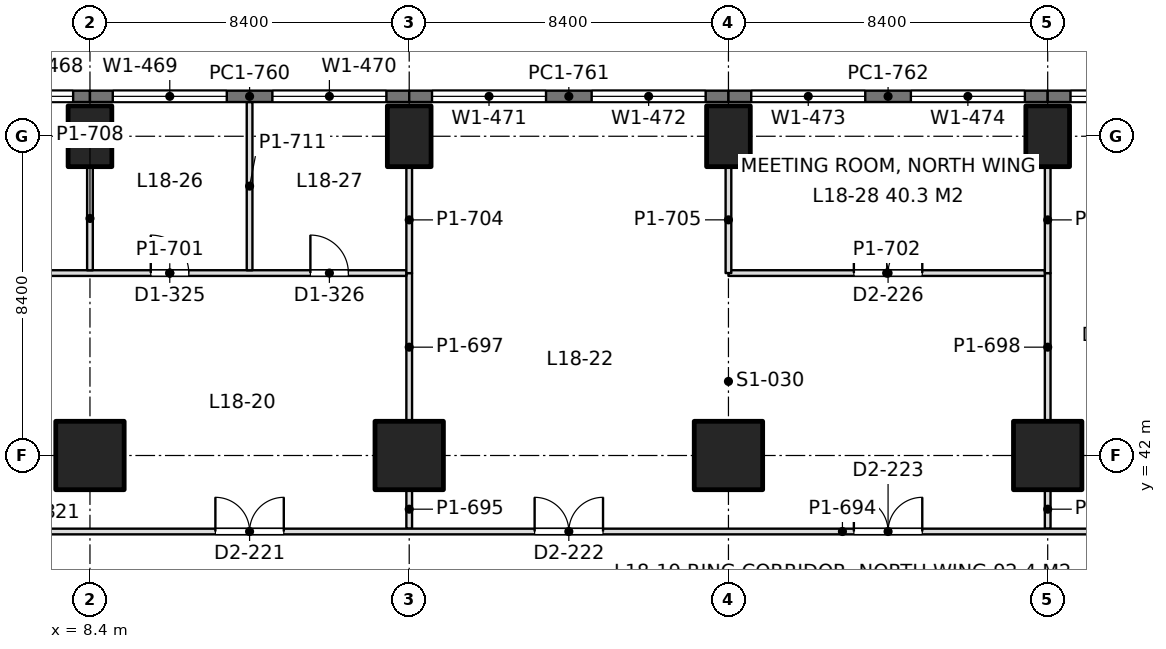
"""IFC4 building model, lengths in metres.
Left out: names, types, materials, properties, quantities, classifications, styles, units other than length and angle.
Written with IfcOpenShell. Run it as: python <this file> out.ifc"""

import sys

from ifc_helpers import new_model, si_unit, direction, frame, frame_2d, origin, origin_2d, place, context, subcontext, project, spatial, rectangle, extrude, element, fill, save


model = new_model("IFC4")
c1 = context("Model", 3, precision=1e-05, world=origin(), true_north=direction((0.0, 1.0)))
c2 = subcontext(c1, "Body", "Model", "MODEL_VIEW")
j1 = project(units=[si_unit("LENGTHUNIT", "METRE"), si_unit("PLANEANGLEUNIT", "RADIAN")], contexts=[c1])
p1 = place(None, origin())
s1 = spatial("IfcSite", under=j1, at=p1, CompositionType="ELEMENT")
p2 = place(p1, origin())
s2 = spatial("IfcBuilding", under=s1, at=p2, CompositionType="ELEMENT")
p3 = place(p2, frame((0.0, 0.0, 81.9)))
s3 = spatial("IfcBuildingStorey", under=s2, at=p3, CompositionType="ELEMENT", Elevation=81.9)
p4 = place(p3, frame((8.4, 42.0, 0.0), z_axis=(0.0, 0.0, 1.0), x_axis=(1.0, 0.0, 0.0)))
e1 = element("IfcColumn", 1, at=p4, inside=s3, PredefinedType="COLUMN", context=c2, shape_type="SweptSolid", body=[
    extrude(rectangle(XDim=1.8, YDim=1.8, at=origin_2d()), origin(), (0.0, 0.0, 1.0), 4.5),
])
p5 = place(p3, frame((8.4, 50.4, 0.0), z_axis=(0.0, 0.0, 1.0), x_axis=(1.0, 0.0, 0.0)))
e2 = element("IfcColumn", 2, at=p5, inside=s3, PredefinedType="COLUMN", context=c2, shape_type="SweptSolid", body=[
    extrude(rectangle(XDim=1.15, YDim=1.6, at=origin_2d()), origin(), (0.0, 0.0, 1.0), 4.5),
])
p6 = place(p3, frame((16.8, 42.0, 0.0), z_axis=(0.0, 0.0, 1.0), x_axis=(1.0, 0.0, 0.0)))
e3 = element("IfcColumn", 3, at=p6, inside=s3, PredefinedType="COLUMN", context=c2, shape_type="SweptSolid", body=[
    extrude(rectangle(XDim=1.8, YDim=1.8, at=origin_2d()), origin(), (0.0, 0.0, 1.0), 4.5),
])
p7 = place(p3, frame((16.8, 50.4, 0.0), z_axis=(0.0, 0.0, 1.0), x_axis=(1.0, 0.0, 0.0)))
e4 = element("IfcColumn", 4, at=p7, inside=s3, PredefinedType="COLUMN", context=c2, shape_type="SweptSolid", body=[
    extrude(rectangle(XDim=1.15, YDim=1.6, at=origin_2d()), origin(), (0.0, 0.0, 1.0), 4.5),
])
p8 = place(p3, frame((25.2, 42.0, 0.0), z_axis=(0.0, 0.0, 1.0), x_axis=(1.0, 0.0, 0.0)))
e5 = element("IfcColumn", 5, at=p8, inside=s3, PredefinedType="COLUMN", context=c2, shape_type="SweptSolid", body=[
    extrude(rectangle(XDim=1.8, YDim=1.8, at=origin_2d()), origin(), (0.0, 0.0, 1.0), 4.5),
])
p9 = place(p3, frame((25.2, 50.4, 0.0), z_axis=(0.0, 0.0, 1.0), x_axis=(1.0, 0.0, 0.0)))
e6 = element("IfcColumn", 6, at=p9, inside=s3, PredefinedType="COLUMN", context=c2, shape_type="SweptSolid", body=[
    extrude(rectangle(XDim=1.15, YDim=1.6, at=origin_2d()), origin(), (0.0, 0.0, 1.0), 4.5),
])
p10 = place(p3, frame((33.6, 42.0, 0.0), z_axis=(0.0, 0.0, 1.0), x_axis=(1.0, 0.0, 0.0)))
e7 = element("IfcColumn", 7, at=p10, inside=s3, PredefinedType="COLUMN", context=c2, shape_type="SweptSolid", body=[
    extrude(rectangle(XDim=1.8, YDim=1.8, at=origin_2d()), origin(), (0.0, 0.0, 1.0), 4.5),
])
p11 = place(p3, frame((33.6, 50.4, 0.0), z_axis=(0.0, 0.0, 1.0), x_axis=(1.0, 0.0, 0.0)))
e8 = element("IfcColumn", 8, at=p11, inside=s3, PredefinedType="COLUMN", context=c2, shape_type="SweptSolid", body=[
    extrude(rectangle(XDim=1.15, YDim=1.6, at=origin_2d()), origin(), (0.0, 0.0, 1.0), 4.5),
])
p12 = place(p3, frame((0.315, 51.45, 0.0), z_axis=(0.0, 0.0, 1.0), x_axis=(1.0, 0.0, 0.0)))
e9 = element("IfcWall", 9, at=p12, inside=s3, PredefinedType="SOLIDWALL", context=c2, shape_type="SweptSolid", body=[
    extrude(rectangle(XDim=8.085, YDim=0.3, at=frame_2d((4.042, 0.0))), origin(), (0.0, 0.0, 1.0), 4.34),
])
p13 = place(p12, frame((0.443, 0.0, 0.9)))
e10 = element("IfcOpeningElement", 10, at=p13, cuts=e9, PredefinedType="OPENING", context=c2, shape_type="SweptSolid", body=[
    extrude(rectangle(XDim=3.0, YDim=1.9, at=frame_2d((1.5, 0.95))), frame((0.0, 0.16, 0.0), z_axis=(0.0, -1.0, 0.0), x_axis=(1.0, 0.0, 0.0)), (0.0, 0.0, 1.0), 0.32),
])
p14 = place(p12, frame((4.643, 0.0, 0.9)))
e11 = element("IfcOpeningElement", 11, at=p14, cuts=e9, PredefinedType="OPENING", context=c2, shape_type="SweptSolid", body=[
    extrude(rectangle(XDim=3.0, YDim=1.9, at=frame_2d((1.5, 0.95))), frame((0.0, 0.16, 0.0), z_axis=(0.0, -1.0, 0.0), x_axis=(1.0, 0.0, 0.0)), (0.0, 0.0, 1.0), 0.32),
])
p15 = place(p3, frame((8.4, 51.45, 0.0), z_axis=(0.0, 0.0, 1.0), x_axis=(1.0, 0.0, 0.0)))
e12 = element("IfcWall", 12, at=p15, inside=s3, PredefinedType="SOLIDWALL", context=c2, shape_type="SweptSolid", body=[
    extrude(rectangle(XDim=8.4, YDim=0.3, at=frame_2d((4.2, 0.0))), origin(), (0.0, 0.0, 1.0), 4.34),
])
p16 = place(p15, frame((0.6, 0.0, 0.9)))
e13 = element("IfcOpeningElement", 13, at=p16, cuts=e12, PredefinedType="OPENING", context=c2, shape_type="SweptSolid", body=[
    extrude(rectangle(XDim=3.0, YDim=1.9, at=frame_2d((1.5, 0.95))), frame((0.0, 0.16, 0.0), z_axis=(0.0, -1.0, 0.0), x_axis=(1.0, 0.0, 0.0)), (0.0, 0.0, 1.0), 0.32),
])
p17 = place(p15, frame((4.8, 0.0, 0.9)))
e14 = element("IfcOpeningElement", 14, at=p17, cuts=e12, PredefinedType="OPENING", context=c2, shape_type="SweptSolid", body=[
    extrude(rectangle(XDim=3.0, YDim=1.9, at=frame_2d((1.5, 0.95))), frame((0.0, 0.16, 0.0), z_axis=(0.0, -1.0, 0.0), x_axis=(1.0, 0.0, 0.0)), (0.0, 0.0, 1.0), 0.32),
])
p18 = place(p3, frame((16.8, 51.45, 0.0), z_axis=(0.0, 0.0, 1.0), x_axis=(1.0, 0.0, 0.0)))
e15 = element("IfcWall", 15, at=p18, inside=s3, PredefinedType="SOLIDWALL", context=c2, shape_type="SweptSolid", body=[
    extrude(rectangle(XDim=8.4, YDim=0.3, at=frame_2d((4.2, 0.0))), origin(), (0.0, 0.0, 1.0), 4.34),
])
p19 = place(p18, frame((0.6, 0.0, 0.9)))
e16 = element("IfcOpeningElement", 16, at=p19, cuts=e15, PredefinedType="OPENING", context=c2, shape_type="SweptSolid", body=[
    extrude(rectangle(XDim=3.0, YDim=1.9, at=frame_2d((1.5, 0.95))), frame((0.0, 0.16, 0.0), z_axis=(0.0, -1.0, 0.0), x_axis=(1.0, 0.0, 0.0)), (0.0, 0.0, 1.0), 0.32),
])
p20 = place(p18, frame((4.8, 0.0, 0.9)))
e17 = element("IfcOpeningElement", 17, at=p20, cuts=e15, PredefinedType="OPENING", context=c2, shape_type="SweptSolid", body=[
    extrude(rectangle(XDim=3.0, YDim=1.9, at=frame_2d((1.5, 0.95))), frame((0.0, 0.16, 0.0), z_axis=(0.0, -1.0, 0.0), x_axis=(1.0, 0.0, 0.0)), (0.0, 0.0, 1.0), 0.32),
])
p21 = place(p3, frame((25.2, 51.45, 0.0), z_axis=(0.0, 0.0, 1.0), x_axis=(1.0, 0.0, 0.0)))
e18 = element("IfcWall", 18, at=p21, inside=s3, PredefinedType="SOLIDWALL", context=c2, shape_type="SweptSolid", body=[
    extrude(rectangle(XDim=8.4, YDim=0.3, at=frame_2d((4.2, 0.0))), origin(), (0.0, 0.0, 1.0), 4.34),
])
p22 = place(p21, frame((0.6, 0.0, 0.9)))
e19 = element("IfcOpeningElement", 19, at=p22, cuts=e18, PredefinedType="OPENING", context=c2, shape_type="SweptSolid", body=[
    extrude(rectangle(XDim=3.0, YDim=1.9, at=frame_2d((1.5, 0.95))), frame((0.0, 0.16, 0.0), z_axis=(0.0, -1.0, 0.0), x_axis=(1.0, 0.0, 0.0)), (0.0, 0.0, 1.0), 0.32),
])
p23 = place(p21, frame((4.8, 0.0, 0.9)))
e20 = element("IfcOpeningElement", 20, at=p23, cuts=e18, PredefinedType="OPENING", context=c2, shape_type="SweptSolid", body=[
    extrude(rectangle(XDim=3.0, YDim=1.9, at=frame_2d((1.5, 0.95))), frame((0.0, 0.16, 0.0), z_axis=(0.0, -1.0, 0.0), x_axis=(1.0, 0.0, 0.0)), (0.0, 0.0, 1.0), 0.32),
])
p24 = place(p3, frame((33.6, 51.45, 0.0), z_axis=(0.0, 0.0, 1.0), x_axis=(1.0, 0.0, 0.0)))
e21 = element("IfcWall", 21, at=p24, inside=s3, PredefinedType="SOLIDWALL", context=c2, shape_type="SweptSolid", body=[
    extrude(rectangle(XDim=8.4, YDim=0.3, at=frame_2d((4.2, 0.0))), origin(), (0.0, 0.0, 1.0), 4.34),
])
p25 = place(p24, frame((0.6, 0.0, 0.9)))
e22 = element("IfcOpeningElement", 22, at=p25, cuts=e21, PredefinedType="OPENING", context=c2, shape_type="SweptSolid", body=[
    extrude(rectangle(XDim=3.0, YDim=1.9, at=frame_2d((1.5, 0.95))), frame((0.0, 0.16, 0.0), z_axis=(0.0, -1.0, 0.0), x_axis=(1.0, 0.0, 0.0)), (0.0, 0.0, 1.0), 0.32),
])
p26 = place(p24, frame((4.8, 0.0, 0.9)))
e23 = element("IfcOpeningElement", 23, at=p26, cuts=e21, PredefinedType="OPENING", context=c2, shape_type="SweptSolid", body=[
    extrude(rectangle(XDim=3.0, YDim=1.9, at=frame_2d((1.5, 0.95))), frame((0.0, 0.16, 0.0), z_axis=(0.0, -1.0, 0.0), x_axis=(1.0, 0.0, 0.0)), (0.0, 0.0, 1.0), 0.32),
])
p27 = place(p3, frame((4.274, 46.8, 0.0), z_axis=(0.0, 0.0, 1.0), x_axis=(1.0, 0.0, 0.0)))
e24 = element("IfcWall", 24, at=p27, inside=s3, PredefinedType="PARTITIONING", context=c2, shape_type="SweptSolid", body=[
    extrude(rectangle(XDim=12.452, YDim=0.15, at=frame_2d((6.226, 0.0))), origin(), (0.0, 0.0, 1.0), 3.74),
])
p28 = place(p27, frame((1.526, 0.0, 0.0)))
e25 = element("IfcOpeningElement", 25, at=p28, cuts=e24, PredefinedType="OPENING", context=c2, shape_type="SweptSolid", body=[
    extrude(rectangle(XDim=1.0, YDim=2.2, at=frame_2d((0.5, 1.1))), frame((0.0, 0.085, 0.0), z_axis=(0.0, -1.0, 0.0), x_axis=(1.0, 0.0, 0.0)), (0.0, 0.0, 1.0), 0.17),
])
p29 = place(p27, frame((5.726, 0.0, 0.0)))
e26 = element("IfcOpeningElement", 26, at=p29, cuts=e24, PredefinedType="OPENING", context=c2, shape_type="SweptSolid", body=[
    extrude(rectangle(XDim=1.0, YDim=2.2, at=frame_2d((0.5, 1.1))), frame((0.0, 0.085, 0.0), z_axis=(0.0, -1.0, 0.0), x_axis=(1.0, 0.0, 0.0)), (0.0, 0.0, 1.0), 0.17),
])
p30 = place(p27, frame((9.926, 0.0, 0.0)))
e27 = element("IfcOpeningElement", 27, at=p30, cuts=e24, PredefinedType="OPENING", context=c2, shape_type="SweptSolid", body=[
    extrude(rectangle(XDim=1.0, YDim=2.2, at=frame_2d((0.5, 1.1))), frame((0.0, 0.085, 0.0), z_axis=(0.0, -1.0, 0.0), x_axis=(1.0, 0.0, 0.0)), (0.0, 0.0, 1.0), 0.17),
])
p31 = place(p3, frame((8.4, 46.874, 0.0), z_axis=(0.0, 0.0, 1.0), x_axis=(0.0, 1.0, 0.0)))
e28 = element("IfcWall", 28, at=p31, inside=s3, PredefinedType="PARTITIONING", context=c2, shape_type="SweptSolid", body=[
    extrude(rectangle(XDim=2.727, YDim=0.15, at=frame_2d((1.364, 0.0))), origin(), (0.0, 0.0, 1.0), 3.74),
])
p32 = place(p3, frame((12.6, 46.874, 0.0), z_axis=(0.0, 0.0, 1.0), x_axis=(0.0, 1.0, 0.0)))
e29 = element("IfcWall", 29, at=p32, inside=s3, PredefinedType="PARTITIONING", context=c2, shape_type="SweptSolid", body=[
    extrude(rectangle(XDim=4.428, YDim=0.15, at=frame_2d((2.214, 0.0))), origin(), (0.0, 0.0, 1.0), 3.84),
])
p33 = place(p3, frame((16.8, 46.798, 0.0), z_axis=(0.0, 0.0, 1.0), x_axis=(0.0, 1.0, 0.0)))
e30 = element("IfcWall", 30, at=p33, inside=s3, PredefinedType="PARTITIONING", context=c2, shape_type="SweptSolid", body=[
    extrude(rectangle(XDim=2.803, YDim=0.15, at=frame_2d((1.401, 0.0))), origin(), (0.0, 0.0, 1.0), 3.74),
])
p34 = place(p3, frame((25.2, 46.8, 0.0), z_axis=(0.0, 0.0, 1.0), x_axis=(1.0, 0.0, 0.0)))
e31 = element("IfcWall", 31, at=p34, inside=s3, PredefinedType="PARTITIONING", context=c2, shape_type="SweptSolid", body=[
    extrude(rectangle(XDim=8.326, YDim=0.15, at=frame_2d((4.163, 0.0))), origin(), (0.0, 0.0, 1.0), 3.74),
])
p35 = place(p34, frame((3.3, 0.0, 0.0)))
e32 = element("IfcOpeningElement", 32, at=p35, cuts=e31, PredefinedType="OPENING", context=c2, shape_type="SweptSolid", body=[
    extrude(rectangle(XDim=1.8, YDim=2.2, at=frame_2d((0.9, 1.1))), frame((0.0, 0.085, 0.0), z_axis=(0.0, -1.0, 0.0), x_axis=(1.0, 0.0, 0.0)), (0.0, 0.0, 1.0), 0.17),
])
p36 = place(p3, frame((25.2, 46.8, 0.0), z_axis=(0.0, 0.0, 1.0), x_axis=(0.0, 1.0, 0.0)))
e33 = element("IfcWall", 33, at=p36, inside=s3, PredefinedType="PARTITIONING", context=c2, shape_type="SweptSolid", body=[
    extrude(rectangle(XDim=2.801, YDim=0.15, at=frame_2d((1.4, 0.0))), origin(), (0.0, 0.0, 1.0), 3.74),
])
p37 = place(p3, frame((33.6, 46.798, 0.0), z_axis=(0.0, 0.0, 1.0), x_axis=(0.0, 1.0, 0.0)))
e34 = element("IfcWall", 34, at=p37, inside=s3, PredefinedType="PARTITIONING", context=c2, shape_type="SweptSolid", body=[
    extrude(rectangle(XDim=2.803, YDim=0.15, at=frame_2d((1.401, 0.0))), origin(), (0.0, 0.0, 1.0), 3.74),
])
p38 = place(p3, frame((16.8, 40.074, 0.0), z_axis=(0.0, 0.0, 1.0), x_axis=(0.0, 1.0, 0.0)))
e35 = element("IfcWall", 35, at=p38, inside=s3, PredefinedType="PARTITIONING", context=c2, shape_type="SweptSolid", body=[
    extrude(rectangle(XDim=1.027, YDim=0.15, at=frame_2d((0.514, 0.0))), origin(), (0.0, 0.0, 1.0), 3.98),
])
p39 = place(p3, frame((16.8, 42.899, 0.0), z_axis=(0.0, 0.0, 1.0), x_axis=(0.0, 1.0, 0.0)))
e36 = element("IfcWall", 36, at=p39, inside=s3, PredefinedType="PARTITIONING", context=c2, shape_type="SweptSolid", body=[
    extrude(rectangle(XDim=3.903, YDim=0.15, at=frame_2d((1.952, 0.0))), origin(), (0.0, 0.0, 1.0), 3.74),
])
p40 = place(p3, frame((33.6, 40.074, 0.0), z_axis=(0.0, 0.0, 1.0), x_axis=(0.0, 1.0, 0.0)))
e37 = element("IfcWall", 37, at=p40, inside=s3, PredefinedType="PARTITIONING", context=c2, shape_type="SweptSolid", body=[
    extrude(rectangle(XDim=1.027, YDim=0.15, at=frame_2d((0.514, 0.0))), origin(), (0.0, 0.0, 1.0), 3.98),
])
p41 = place(p3, frame((33.6, 42.899, 0.0), z_axis=(0.0, 0.0, 1.0), x_axis=(0.0, 1.0, 0.0)))
e38 = element("IfcWall", 38, at=p41, inside=s3, PredefinedType="PARTITIONING", context=c2, shape_type="SweptSolid", body=[
    extrude(rectangle(XDim=3.903, YDim=0.15, at=frame_2d((1.952, 0.0))), origin(), (0.0, 0.0, 1.0), 3.74),
])
p42 = place(p3, frame((7.198, 40.0, 0.0), z_axis=(0.0, 0.0, 1.0), x_axis=(1.0, 0.0, 0.0)))
e39 = element("IfcWall", 39, at=p42, inside=s3, PredefinedType="PARTITIONING", context=c2, shape_type="SweptSolid", body=[
    extrude(rectangle(XDim=42.002, YDim=0.15, at=frame_2d((21.001, 0.0))), origin(), (0.0, 0.0, 1.0), 3.74),
])
p43 = place(p42, frame((4.502, 0.0, 0.0)))
e40 = element("IfcOpeningElement", 40, at=p43, cuts=e39, PredefinedType="OPENING", context=c2, shape_type="SweptSolid", body=[
    extrude(rectangle(XDim=1.8, YDim=2.2, at=frame_2d((0.9, 1.1))), frame((0.0, 0.085, 0.0), z_axis=(0.0, -1.0, 0.0), x_axis=(1.0, 0.0, 0.0)), (0.0, 0.0, 1.0), 0.17),
])
p44 = place(p42, frame((12.902, 0.0, 0.0)))
e41 = element("IfcOpeningElement", 41, at=p44, cuts=e39, PredefinedType="OPENING", context=c2, shape_type="SweptSolid", body=[
    extrude(rectangle(XDim=1.8, YDim=2.2, at=frame_2d((0.9, 1.1))), frame((0.0, 0.085, 0.0), z_axis=(0.0, -1.0, 0.0), x_axis=(1.0, 0.0, 0.0)), (0.0, 0.0, 1.0), 0.17),
])
p45 = place(p42, frame((21.302, 0.0, 0.0)))
e42 = element("IfcOpeningElement", 42, at=p45, cuts=e39, PredefinedType="OPENING", context=c2, shape_type="SweptSolid", body=[
    extrude(rectangle(XDim=1.8, YDim=2.2, at=frame_2d((0.9, 1.1))), frame((0.0, 0.085, 0.0), z_axis=(0.0, -1.0, 0.0), x_axis=(1.0, 0.0, 0.0)), (0.0, 0.0, 1.0), 0.17),
])
p46 = place(p42, frame((29.702, 0.0, 0.0)))
e43 = element("IfcOpeningElement", 43, at=p46, cuts=e39, PredefinedType="OPENING", context=c2, shape_type="SweptSolid", body=[
    extrude(rectangle(XDim=1.8, YDim=2.2, at=frame_2d((0.9, 1.1))), frame((0.0, 0.085, 0.0), z_axis=(0.0, -1.0, 0.0), x_axis=(1.0, 0.0, 0.0)), (0.0, 0.0, 1.0), 0.17),
])
p47 = place(p42, frame((38.102, 0.0, 0.0)))
e44 = element("IfcOpeningElement", 44, at=p47, cuts=e39, PredefinedType="OPENING", context=c2, shape_type="SweptSolid", body=[
    extrude(rectangle(XDim=1.8, YDim=2.2, at=frame_2d((0.9, 1.1))), frame((0.0, 0.085, 0.0), z_axis=(0.0, -1.0, 0.0), x_axis=(1.0, 0.0, 0.0)), (0.0, 0.0, 1.0), 0.17),
])
p48 = place(p14, origin())
e45 = element("IfcWindow", 45, at=p48, inside=s3, PartitioningType="SINGLE_PANEL", PredefinedType="WINDOW", context=c2, shape_type="SweptSolid", body=[
    extrude(rectangle(XDim=3.0, YDim=1.9, at=frame_2d((1.5, 0.95))), frame((0.0, 0.03, 0.0), z_axis=(0.0, -1.0, 0.0), x_axis=(1.0, 0.0, 0.0)), (0.0, 0.0, 1.0), 0.06),
])
fill(e11, e45)
p49 = place(p16, origin())
e46 = element("IfcWindow", 46, at=p49, inside=s3, PartitioningType="SINGLE_PANEL", PredefinedType="WINDOW", context=c2, shape_type="SweptSolid", body=[
    extrude(rectangle(XDim=3.0, YDim=1.9, at=frame_2d((1.5, 0.95))), frame((0.0, 0.03, 0.0), z_axis=(0.0, -1.0, 0.0), x_axis=(1.0, 0.0, 0.0)), (0.0, 0.0, 1.0), 0.06),
])
fill(e13, e46)
p50 = place(p17, origin())
e47 = element("IfcWindow", 47, at=p50, inside=s3, PartitioningType="SINGLE_PANEL", PredefinedType="WINDOW", context=c2, shape_type="SweptSolid", body=[
    extrude(rectangle(XDim=3.0, YDim=1.9, at=frame_2d((1.5, 0.95))), frame((0.0, 0.03, 0.0), z_axis=(0.0, -1.0, 0.0), x_axis=(1.0, 0.0, 0.0)), (0.0, 0.0, 1.0), 0.06),
])
fill(e14, e47)
p51 = place(p19, origin())
e48 = element("IfcWindow", 48, at=p51, inside=s3, PartitioningType="SINGLE_PANEL", PredefinedType="WINDOW", context=c2, shape_type="SweptSolid", body=[
    extrude(rectangle(XDim=3.0, YDim=1.9, at=frame_2d((1.5, 0.95))), frame((0.0, 0.03, 0.0), z_axis=(0.0, -1.0, 0.0), x_axis=(1.0, 0.0, 0.0)), (0.0, 0.0, 1.0), 0.06),
])
fill(e16, e48)
p52 = place(p20, origin())
e49 = element("IfcWindow", 49, at=p52, inside=s3, PartitioningType="SINGLE_PANEL", PredefinedType="WINDOW", context=c2, shape_type="SweptSolid", body=[
    extrude(rectangle(XDim=3.0, YDim=1.9, at=frame_2d((1.5, 0.95))), frame((0.0, 0.03, 0.0), z_axis=(0.0, -1.0, 0.0), x_axis=(1.0, 0.0, 0.0)), (0.0, 0.0, 1.0), 0.06),
])
fill(e17, e49)
p53 = place(p22, origin())
e50 = element("IfcWindow", 50, at=p53, inside=s3, PartitioningType="SINGLE_PANEL", PredefinedType="WINDOW", context=c2, shape_type="SweptSolid", body=[
    extrude(rectangle(XDim=3.0, YDim=1.9, at=frame_2d((1.5, 0.95))), frame((0.0, 0.03, 0.0), z_axis=(0.0, -1.0, 0.0), x_axis=(1.0, 0.0, 0.0)), (0.0, 0.0, 1.0), 0.06),
])
fill(e19, e50)
p54 = place(p23, origin())
e51 = element("IfcWindow", 51, at=p54, inside=s3, PartitioningType="SINGLE_PANEL", PredefinedType="WINDOW", context=c2, shape_type="SweptSolid", body=[
    extrude(rectangle(XDim=3.0, YDim=1.9, at=frame_2d((1.5, 0.95))), frame((0.0, 0.03, 0.0), z_axis=(0.0, -1.0, 0.0), x_axis=(1.0, 0.0, 0.0)), (0.0, 0.0, 1.0), 0.06),
])
fill(e20, e51)
p55 = place(p25, origin())
e52 = element("IfcWindow", 52, at=p55, inside=s3, PartitioningType="SINGLE_PANEL", PredefinedType="WINDOW", context=c2, shape_type="SweptSolid", body=[
    extrude(rectangle(XDim=3.0, YDim=1.9, at=frame_2d((1.5, 0.95))), frame((0.0, 0.03, 0.0), z_axis=(0.0, -1.0, 0.0), x_axis=(1.0, 0.0, 0.0)), (0.0, 0.0, 1.0), 0.06),
])
fill(e22, e52)
p56 = place(p29, origin())
e53 = element("IfcDoor", 53, at=p56, inside=s3, OperationType="SINGLE_SWING_LEFT", PredefinedType="DOOR", context=c2, shape_type="SweptSolid", body=[
    extrude(rectangle(XDim=1.0, YDim=2.2, at=frame_2d((0.5, 1.1))), frame((0.0, 0.025, 0.0), z_axis=(0.0, -1.0, 0.0), x_axis=(1.0, 0.0, 0.0)), (0.0, 0.0, 1.0), 0.05),
])
fill(e26, e53)
p57 = place(p30, origin())
e54 = element("IfcDoor", 54, at=p57, inside=s3, OperationType="SINGLE_SWING_LEFT", PredefinedType="DOOR", context=c2, shape_type="SweptSolid", body=[
    extrude(rectangle(XDim=1.0, YDim=2.2, at=frame_2d((0.5, 1.1))), frame((0.0, 0.025, 0.0), z_axis=(0.0, -1.0, 0.0), x_axis=(1.0, 0.0, 0.0)), (0.0, 0.0, 1.0), 0.05),
])
fill(e27, e54)
p58 = place(p35, origin())
e55 = element("IfcDoor", 55, at=p58, inside=s3, OperationType="DOUBLE_DOOR_SINGLE_SWING", PredefinedType="DOOR", context=c2, shape_type="SweptSolid", body=[
    extrude(rectangle(XDim=1.8, YDim=2.2, at=frame_2d((0.9, 1.1))), frame((0.0, 0.025, 0.0), z_axis=(0.0, -1.0, 0.0), x_axis=(1.0, 0.0, 0.0)), (0.0, 0.0, 1.0), 0.05),
])
fill(e32, e55)
p59 = place(p43, origin())
e56 = element("IfcDoor", 56, at=p59, inside=s3, OperationType="DOUBLE_DOOR_SINGLE_SWING", PredefinedType="DOOR", context=c2, shape_type="SweptSolid", body=[
    extrude(rectangle(XDim=1.8, YDim=2.2, at=frame_2d((0.9, 1.1))), frame((0.0, 0.025, 0.0), z_axis=(0.0, -1.0, 0.0), x_axis=(1.0, 0.0, 0.0)), (0.0, 0.0, 1.0), 0.05),
])
fill(e40, e56)
p60 = place(p44, origin())
e57 = element("IfcDoor", 57, at=p60, inside=s3, OperationType="DOUBLE_DOOR_SINGLE_SWING", PredefinedType="DOOR", context=c2, shape_type="SweptSolid", body=[
    extrude(rectangle(XDim=1.8, YDim=2.2, at=frame_2d((0.9, 1.1))), frame((0.0, 0.025, 0.0), z_axis=(0.0, -1.0, 0.0), x_axis=(1.0, 0.0, 0.0)), (0.0, 0.0, 1.0), 0.05),
])
fill(e41, e57)
p61 = place(p45, origin())
e58 = element("IfcDoor", 58, at=p61, inside=s3, OperationType="DOUBLE_DOOR_SINGLE_SWING", PredefinedType="DOOR", context=c2, shape_type="SweptSolid", body=[
    extrude(rectangle(XDim=1.8, YDim=2.2, at=frame_2d((0.9, 1.1))), frame((0.0, 0.025, 0.0), z_axis=(0.0, -1.0, 0.0), x_axis=(1.0, 0.0, 0.0)), (0.0, 0.0, 1.0), 0.05),
])
fill(e42, e58)
save(model, sys.argv[1])
